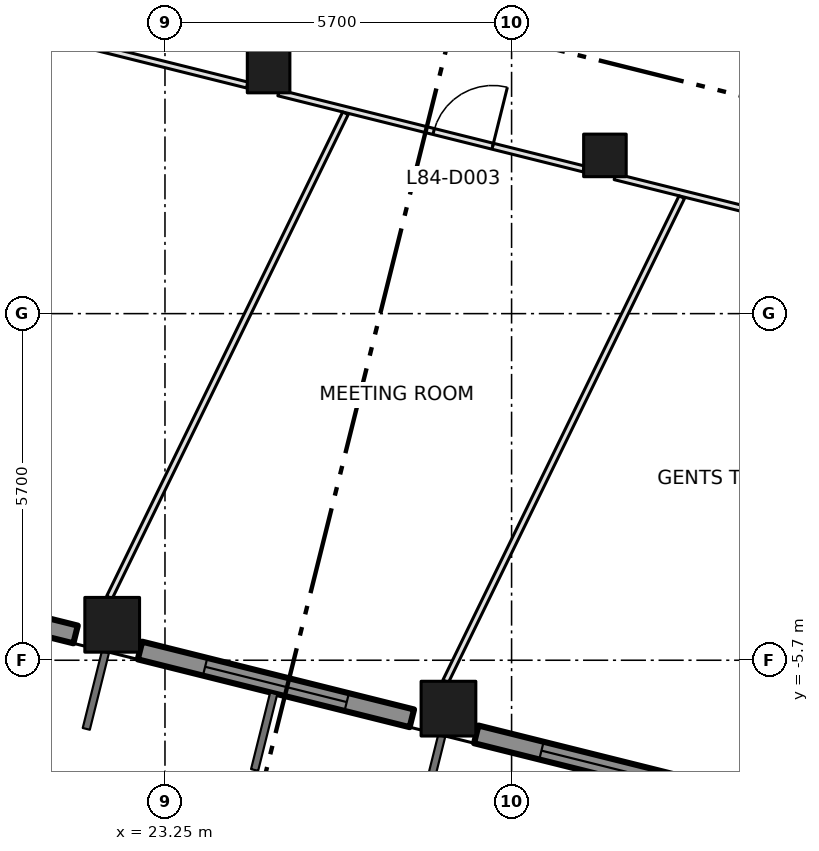
"""IFC4 building model, lengths in metres.
Left out: names, types, materials, properties, quantities, classifications, styles, units other than length and angle.
Written with IfcOpenShell. Run it as: python <this file> out.ifc"""

import sys

from ifc_helpers import new_model, si_unit, direction, frame, frame_2d, origin, origin_2d, place, context, subcontext, project, spatial, rectangle, extrude, element, fill, save


model = new_model("IFC4")
c1 = context("Model", 3, precision=1e-05, world=origin(), true_north=direction((0.0, 1.0)))
c2 = subcontext(c1, "Body", "Model", "MODEL_VIEW")
j1 = project(units=[si_unit("LENGTHUNIT", "METRE"), si_unit("PLANEANGLEUNIT", "RADIAN")], contexts=[c1])
p1 = place(None, origin())
s1 = spatial("IfcSite", under=j1, at=p1, CompositionType="ELEMENT")
p2 = place(p1, origin())
s2 = spatial("IfcBuilding", under=s1, at=p2, CompositionType="ELEMENT")
p3 = place(p2, frame((0.0, 0.0, 366.6)))
s3 = spatial("IfcBuildingStorey", under=s2, at=p3, CompositionType="ELEMENT", Elevation=366.6)
for number, where, z_axis, x_axis in (
    (1, (22.382, -5.117, 0.0), (0.0, 0.0, 1.0), (1.0, 0.0, 0.0)),
    (2, (27.912, -6.496, 0.0), (0.0, 0.0, 1.0), (1.0, 0.0, 0.0)),
):
    element("IfcColumn", number, at=place(p3, frame(where, z_axis=z_axis, x_axis=x_axis)), inside=s3, PredefinedType="COLUMN", context=c2, shape_type="SweptSolid", body=[
        extrude(rectangle(XDim=0.9, YDim=0.9, at=origin_2d()), origin(), (0.0, 0.0, 1.0), 4.2),
    ])
for number, where, z_axis, x_axis in (
    (3, (24.954, 3.981, 0.0), (0.0, 0.0, 1.0), (1.0, 0.0, 0.0)),
    (4, (30.485, 2.602, 0.0), (0.0, 0.0, 1.0), (1.0, 0.0, 0.0)),
):
    element("IfcColumn", number, at=place(p3, frame(where, z_axis=z_axis, x_axis=x_axis)), inside=s3, PredefinedType="COLUMN", context=c2, shape_type="SweptSolid", body=[
        extrude(rectangle(XDim=0.7, YDim=0.7, at=origin_2d()), origin(), (0.0, 0.0, 1.0), 4.2),
    ])
p4 = place(p3, frame((17.308, -4.161, 0.0), z_axis=(0.0, 0.0, 1.0), x_axis=(0.970294992984, -0.241924836652, 0.0)))
e5 = element("IfcWall", 5, at=p4, inside=s3, PredefinedType="SOLIDWALL", context=c2, shape_type="SweptSolid", body=[
    extrude(rectangle(XDim=4.609, YDim=0.3, at=frame_2d((2.304, 0.0))), origin(), (0.0, 0.0, 1.0), 3.2),
])
p5 = place(p4, frame((1.105, 0.0, 0.8)))
e6 = element("IfcOpeningElement", 6, at=p5, cuts=e5, PredefinedType="OPENING", context=c2, shape_type="SweptSolid", body=[
    extrude(rectangle(XDim=2.4, YDim=2.1, at=frame_2d((1.2, 1.05))), frame((0.0, 0.16, 0.0), z_axis=(0.0, -1.0, 0.0), x_axis=(1.0, 0.0, 0.0)), (0.0, 0.0, 1.0), 0.32),
])
p6 = place(p3, frame((22.839, -5.54, 0.0), z_axis=(0.0, 0.0, 1.0), x_axis=(0.970282587769, -0.241974585177, 0.0)))
e7 = element("IfcWall", 7, at=p6, inside=s3, PredefinedType="SOLIDWALL", context=c2, shape_type="SweptSolid", body=[
    extrude(rectangle(XDim=4.608, YDim=0.3, at=frame_2d((2.304, 0.0))), origin(), (0.0, 0.0, 1.0), 3.2),
])
p7 = place(p6, frame((1.104, 0.0, 0.8)))
e8 = element("IfcOpeningElement", 8, at=p7, cuts=e7, PredefinedType="OPENING", context=c2, shape_type="SweptSolid", body=[
    extrude(rectangle(XDim=2.4, YDim=2.1, at=frame_2d((1.2, 1.05))), frame((0.0, 0.16, 0.0), z_axis=(0.0, -1.0, 0.0), x_axis=(1.0, 0.0, 0.0)), (0.0, 0.0, 1.0), 0.32),
])
p8 = place(p3, frame((28.369, -6.919, 0.0), z_axis=(0.0, 0.0, 1.0), x_axis=(0.970298093093, -0.241912402618, 0.0)))
e9 = element("IfcWall", 9, at=p8, inside=s3, PredefinedType="SOLIDWALL", context=c2, shape_type="SweptSolid", body=[
    extrude(rectangle(XDim=4.609, YDim=0.3, at=frame_2d((2.305, 0.0))), origin(), (0.0, 0.0, 1.0), 3.2),
])
p9 = place(p8, frame((1.105, 0.0, 0.8)))
e10 = element("IfcOpeningElement", 10, at=p9, cuts=e9, PredefinedType="OPENING", context=c2, shape_type="SweptSolid", body=[
    extrude(rectangle(XDim=2.4, YDim=2.1, at=frame_2d((1.2, 1.05))), frame((0.0, 0.16, 0.0), z_axis=(0.0, -1.0, 0.0), x_axis=(1.0, 0.0, 0.0)), (0.0, 0.0, 1.0), 0.32),
])
p10 = place(p3, frame((19.586, 5.01, 0.0), z_axis=(0.0, 0.0, 1.0), x_axis=(0.970303347181, -0.241891327769, 0.0)))
e11 = element("IfcWall", 11, at=p10, inside=s3, PredefinedType="PARTITIONING", context=c2, shape_type="SweptSolid", body=[
    extrude(rectangle(XDim=5.172, YDim=0.1, at=frame_2d((2.586, 0.0))), origin(), (0.0, 0.0, 1.0), 3.9),
])
p11 = place(p3, frame((25.118, 3.631, 0.0), z_axis=(0.0, 0.0, 1.0), x_axis=(0.970281210621, -0.241980107272, 0.0)))
e12 = element("IfcWall", 12, at=p11, inside=s3, PredefinedType="PARTITIONING", context=c2, shape_type="SweptSolid", body=[
    extrude(rectangle(XDim=5.171, YDim=0.1, at=frame_2d((2.585, 0.0))), origin(), (0.0, 0.0, 1.0), 3.9),
])
p12 = place(p11, frame((2.629, 0.0, 0.0)))
e13 = element("IfcOpeningElement", 13, at=p12, cuts=e12, PredefinedType="OPENING", context=c2, shape_type="SweptSolid", body=[
    extrude(rectangle(XDim=1.0, YDim=2.1, at=frame_2d((0.5, 1.05))), frame((0.0, 0.06, 0.0), z_axis=(0.0, -1.0, 0.0), x_axis=(1.0, 0.0, 0.0)), (0.0, 0.0, 1.0), 0.12),
])
p13 = place(p3, frame((30.649, 2.252, 0.0), z_axis=(0.0, 0.0, 1.0), x_axis=(0.970292295429, -0.241935655561, 0.0)))
e14 = element("IfcWall", 14, at=p13, inside=s3, PredefinedType="PARTITIONING", context=c2, shape_type="SweptSolid", body=[
    extrude(rectangle(XDim=5.171, YDim=0.1, at=frame_2d((2.585, 0.0))), origin(), (0.0, 0.0, 1.0), 3.9),
])
p14 = place(p13, frame((2.729, 0.0, 0.0)))
e15 = element("IfcOpeningElement", 15, at=p14, cuts=e14, PredefinedType="OPENING", context=c2, shape_type="SweptSolid", body=[
    extrude(rectangle(XDim=1.0, YDim=2.1, at=frame_2d((0.5, 1.05))), frame((0.0, 0.06, 0.0), z_axis=(0.0, -1.0, 0.0), x_axis=(1.0, 0.0, 0.0)), (0.0, 0.0, 1.0), 0.12),
])
p15 = place(p3, frame((22.336, -4.667, 0.0), z_axis=(0.0, 0.0, 1.0), x_axis=(0.438261260169, 0.89884763327, 0.0)))
e16 = element("IfcWall", 16, at=p15, inside=s3, PredefinedType="PARTITIONING", context=c2, shape_type="SweptSolid", body=[
    extrude(rectangle(XDim=8.858, YDim=0.1, at=frame_2d((4.429, 0.0))), origin(), (0.0, 0.0, 1.0), 3.9),
])
p16 = place(p3, frame((27.866, -6.046, 0.0), z_axis=(0.0, 0.0, 1.0), x_axis=(0.438350325629, 0.898804201159, 0.0)))
e17 = element("IfcWall", 17, at=p16, inside=s3, PredefinedType="PARTITIONING", context=c2, shape_type="SweptSolid", body=[
    extrude(rectangle(XDim=8.858, YDim=0.1, at=frame_2d((4.429, 0.0))), origin(), (0.0, 0.0, 1.0), 3.9),
])
p17 = place(p7, origin())
e18 = element("IfcWindow", 18, at=p17, inside=s3, PartitioningType="DOUBLE_PANEL_VERTICAL", PredefinedType="WINDOW", context=c2, shape_type="SweptSolid", body=[
    extrude(rectangle(XDim=2.4, YDim=2.1, at=frame_2d((1.2, 1.05))), frame((0.0, 0.03, 0.0), z_axis=(0.0, -1.0, 0.0), x_axis=(1.0, 0.0, 0.0)), (0.0, 0.0, 1.0), 0.06),
])
fill(e8, e18)
p18 = place(p9, origin())
e19 = element("IfcWindow", 19, at=p18, inside=s3, PartitioningType="DOUBLE_PANEL_VERTICAL", PredefinedType="WINDOW", context=c2, shape_type="SweptSolid", body=[
    extrude(rectangle(XDim=2.4, YDim=2.1, at=frame_2d((1.2, 1.05))), frame((0.0, 0.03, 0.0), z_axis=(0.0, -1.0, 0.0), x_axis=(1.0, 0.0, 0.0)), (0.0, 0.0, 1.0), 0.06),
])
fill(e10, e19)
p19 = place(p12, origin())
e20 = element("IfcDoor", 20, at=p19, inside=s3, OperationType="SINGLE_SWING_RIGHT", PredefinedType="DOOR", context=c2, shape_type="SweptSolid", body=[
    extrude(rectangle(XDim=1.0, YDim=2.1, at=frame_2d((0.5, 1.05))), frame((0.0, 0.025, 0.0), z_axis=(0.0, -1.0, 0.0), x_axis=(1.0, 0.0, 0.0)), (0.0, 0.0, 1.0), 0.05),
])
fill(e13, e20)
save(model, sys.argv[1])
